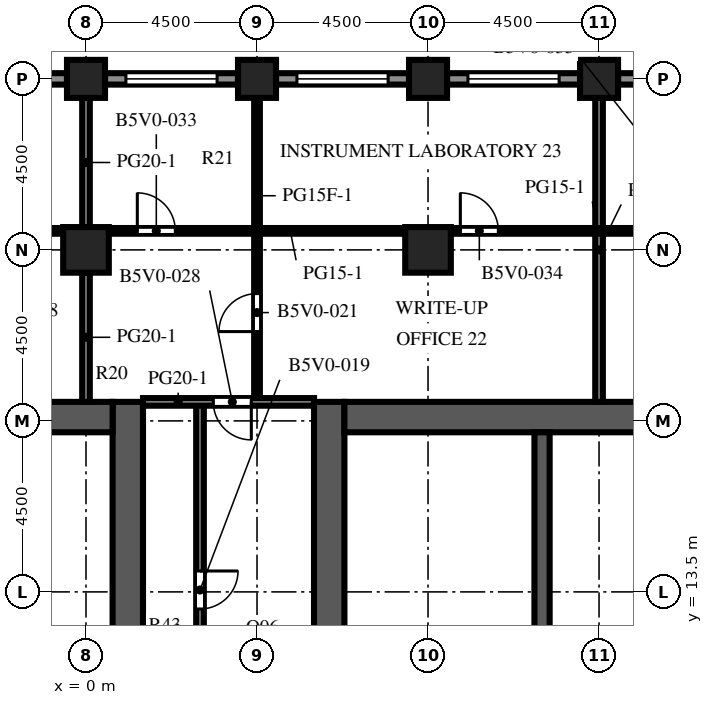
"""IFC4 building model, lengths in metres.
Left out: names, types, materials, properties, quantities, classifications, styles, units other than length and angle.
Written with IfcOpenShell. Run it as: python <this file> out.ifc"""

import sys

from ifc_helpers import new_model, si_unit, direction, frame, frame_2d, origin, origin_2d, place, context, subcontext, project, spatial, rectangle, extrude, element, fill, save


model = new_model("IFC4")
c1 = context("Model", 3, precision=1e-05, world=origin(), true_north=direction((0.0, 1.0)))
c2 = subcontext(c1, "Body", "Model", "MODEL_VIEW")
j1 = project(units=[si_unit("LENGTHUNIT", "METRE"), si_unit("PLANEANGLEUNIT", "RADIAN")], contexts=[c1])
p1 = place(None, origin())
s1 = spatial("IfcSite", under=j1, at=p1, CompositionType="ELEMENT")
p2 = place(p1, origin())
s2 = spatial("IfcBuilding", under=s1, at=p2, CompositionType="ELEMENT")
p3 = place(p2, frame((0.0, 0.0, 160.9)))
s3 = spatial("IfcBuildingStorey", under=s2, at=p3, CompositionType="ELEMENT", Elevation=160.9)
for number, where, z_axis, x_axis in (
    (1, (0.0, 27.0, 0.0), (0.0, 0.0, 1.0), (1.0, 0.0, 0.0)),
    (2, (4.5, 27.0, 0.0), (0.0, 0.0, 1.0), (1.0, 0.0, 0.0)),
    (3, (9.0, 27.0, 0.0), (0.0, 0.0, 1.0), (1.0, 0.0, 0.0)),
    (4, (13.5, 27.0, 0.0), (0.0, 0.0, 1.0), (1.0, 0.0, 0.0)),
):
    element("IfcColumn", number, at=place(p3, frame(where, z_axis=z_axis, x_axis=x_axis)), inside=s3, PredefinedType="COLUMN", context=c2, shape_type="SweptSolid", body=[
        extrude(rectangle(XDim=1.0, YDim=1.0, at=origin_2d()), origin(), (0.0, 0.0, 1.0), 4.1),
    ])
for number, where, z_axis, x_axis in (
    (5, (0.0, 22.5, 0.0), (0.0, 0.0, 1.0), (1.0, 0.0, 0.0)),
    (6, (9.0, 22.5, 0.0), (0.0, 0.0, 1.0), (1.0, 0.0, 0.0)),
):
    element("IfcColumn", number, at=place(p3, frame(where, z_axis=z_axis, x_axis=x_axis)), inside=s3, PredefinedType="COLUMN", context=c2, shape_type="SweptSolid", body=[
        extrude(rectangle(XDim=1.2, YDim=1.2, at=origin_2d()), origin(), (0.0, 0.0, 1.0), 4.1),
    ])
p4 = place(p3, frame((1.1, -9.0, 0.0), z_axis=(0.0, 0.0, 1.0), x_axis=(0.0, 1.0, 0.0)))
e7 = element("IfcWall", 7, at=p4, inside=s3, PredefinedType="SHEAR", context=c2, shape_type="SweptSolid", body=[
    extrude(rectangle(XDim=27.5, YDim=0.8, at=frame_2d((13.75, 0.0))), origin(), (0.0, 0.0, 1.0), 4.1),
])
p5 = place(p4, frame((12.55, 0.0, 0.0)))
e8 = element("IfcOpeningElement", 8, at=p5, cuts=e7, PredefinedType="OPENING", context=c2, shape_type="SweptSolid", body=[
    extrude(rectangle(XDim=2.4, YDim=2.4, at=frame_2d((1.2, 1.2))), frame((0.0, 0.41, 0.0), z_axis=(0.0, -1.0, 0.0), x_axis=(1.0, 0.0, 0.0)), (0.0, 0.0, 1.0), 0.82),
])
p6 = place(p4, frame((5.45, 0.0, 0.0)))
e9 = element("IfcOpeningElement", 9, at=p6, cuts=e7, PredefinedType="OPENING", context=c2, shape_type="SweptSolid", body=[
    extrude(rectangle(XDim=1.2, YDim=2.1, at=frame_2d((0.6, 1.05))), frame((0.0, 0.41, 0.0), z_axis=(0.0, -1.0, 0.0), x_axis=(1.0, 0.0, 0.0)), (0.0, 0.0, 1.0), 0.82),
])
p7 = place(p4, frame((19.45, 0.0, 0.0)))
e10 = element("IfcOpeningElement", 10, at=p7, cuts=e7, PredefinedType="OPENING", context=c2, shape_type="SweptSolid", body=[
    extrude(rectangle(XDim=1.0, YDim=2.1, at=frame_2d((0.5, 1.05))), frame((0.0, 0.41, 0.0), z_axis=(0.0, -1.0, 0.0), x_axis=(1.0, 0.0, 0.0)), (0.0, 0.0, 1.0), 0.82),
])
p8 = place(p4, frame((21.137, 0.0, 0.0)))
e11 = element("IfcOpeningElement", 11, at=p8, cuts=e7, PredefinedType="OPENING", context=c2, shape_type="SweptSolid", body=[
    extrude(rectangle(XDim=1.0, YDim=2.1, at=frame_2d((0.5, 1.05))), frame((0.0, 0.41, 0.0), z_axis=(0.0, -1.0, 0.0), x_axis=(1.0, 0.0, 0.0)), (0.0, 0.0, 1.0), 0.82),
])
p9 = place(p4, frame((23.2, 0.0, 0.0)))
e12 = element("IfcOpeningElement", 12, at=p9, cuts=e7, PredefinedType="OPENING", context=c2, shape_type="SweptSolid", body=[
    extrude(rectangle(XDim=1.0, YDim=2.1, at=frame_2d((0.5, 1.05))), frame((0.0, 0.41, 0.0), z_axis=(0.0, -1.0, 0.0), x_axis=(1.0, 0.0, 0.0)), (0.0, 0.0, 1.0), 0.82),
])
p10 = place(p4, frame((25.262, 0.0, 0.0)))
e13 = element("IfcOpeningElement", 13, at=p10, cuts=e7, PredefinedType="OPENING", context=c2, shape_type="SweptSolid", body=[
    extrude(rectangle(XDim=1.0, YDim=2.1, at=frame_2d((0.5, 1.05))), frame((0.0, 0.41, 0.0), z_axis=(0.0, -1.0, 0.0), x_axis=(1.0, 0.0, 0.0)), (0.0, 0.0, 1.0), 0.82),
])
p11 = place(p3, frame((-9.7, 18.1, 0.0), z_axis=(0.0, 0.0, 1.0), x_axis=(1.0, 0.0, 0.0)))
e14 = element("IfcWall", 14, at=p11, inside=s3, PredefinedType="SHEAR", context=c2, shape_type="SweptSolid", body=[
    extrude(rectangle(XDim=10.4, YDim=0.8, at=frame_2d((5.2, 0.0))), origin(), (0.0, 0.0, 1.0), 4.1),
])
p12 = place(p3, frame((6.4, -9.0, 0.0), z_axis=(0.0, 0.0, 1.0), x_axis=(0.0, 1.0, 0.0)))
e15 = element("IfcWall", 15, at=p12, inside=s3, PredefinedType="SHEAR", context=c2, shape_type="SweptSolid", body=[
    extrude(rectangle(XDim=27.5, YDim=0.8, at=frame_2d((13.75, 0.0))), origin(), (0.0, 0.0, 1.0), 4.1),
])
p13 = place(p12, frame((12.55, 0.0, 0.0)))
e16 = element("IfcOpeningElement", 16, at=p13, cuts=e15, PredefinedType="OPENING", context=c2, shape_type="SweptSolid", body=[
    extrude(rectangle(XDim=2.4, YDim=2.4, at=frame_2d((1.2, 1.2))), frame((0.0, 0.41, 0.0), z_axis=(0.0, -1.0, 0.0), x_axis=(1.0, 0.0, 0.0)), (0.0, 0.0, 1.0), 0.82),
])
p14 = place(p12, frame((5.45, 0.0, 0.0)))
e17 = element("IfcOpeningElement", 17, at=p14, cuts=e15, PredefinedType="OPENING", context=c2, shape_type="SweptSolid", body=[
    extrude(rectangle(XDim=1.2, YDim=2.1, at=frame_2d((0.6, 1.05))), frame((0.0, 0.41, 0.0), z_axis=(0.0, -1.0, 0.0), x_axis=(1.0, 0.0, 0.0)), (0.0, 0.0, 1.0), 0.82),
])
p15 = place(p12, frame((19.45, 0.0, 0.0)))
e18 = element("IfcOpeningElement", 18, at=p15, cuts=e15, PredefinedType="OPENING", context=c2, shape_type="SweptSolid", body=[
    extrude(rectangle(XDim=1.0, YDim=2.1, at=frame_2d((0.5, 1.05))), frame((0.0, 0.41, 0.0), z_axis=(0.0, -1.0, 0.0), x_axis=(1.0, 0.0, 0.0)), (0.0, 0.0, 1.0), 0.82),
])
p16 = place(p12, frame((21.137, 0.0, 0.0)))
e19 = element("IfcOpeningElement", 19, at=p16, cuts=e15, PredefinedType="OPENING", context=c2, shape_type="SweptSolid", body=[
    extrude(rectangle(XDim=1.0, YDim=2.1, at=frame_2d((0.5, 1.05))), frame((0.0, 0.41, 0.0), z_axis=(0.0, -1.0, 0.0), x_axis=(1.0, 0.0, 0.0)), (0.0, 0.0, 1.0), 0.82),
])
p17 = place(p12, frame((23.2, 0.0, 0.0)))
e20 = element("IfcOpeningElement", 20, at=p17, cuts=e15, PredefinedType="OPENING", context=c2, shape_type="SweptSolid", body=[
    extrude(rectangle(XDim=1.0, YDim=2.1, at=frame_2d((0.5, 1.05))), frame((0.0, 0.41, 0.0), z_axis=(0.0, -1.0, 0.0), x_axis=(1.0, 0.0, 0.0)), (0.0, 0.0, 1.0), 0.82),
])
p18 = place(p12, frame((25.262, 0.0, 0.0)))
e21 = element("IfcOpeningElement", 21, at=p18, cuts=e15, PredefinedType="OPENING", context=c2, shape_type="SweptSolid", body=[
    extrude(rectangle(XDim=1.0, YDim=2.1, at=frame_2d((0.5, 1.05))), frame((0.0, 0.41, 0.0), z_axis=(0.0, -1.0, 0.0), x_axis=(1.0, 0.0, 0.0)), (0.0, 0.0, 1.0), 0.82),
])
p19 = place(p3, frame((6.8, 18.1, 0.0), z_axis=(0.0, 0.0, 1.0), x_axis=(1.0, 0.0, 0.0)))
e22 = element("IfcWall", 22, at=p19, inside=s3, PredefinedType="SHEAR", context=c2, shape_type="SweptSolid", body=[
    extrude(rectangle(XDim=10.4, YDim=0.8, at=frame_2d((5.2, 0.0))), origin(), (0.0, 0.0, 1.0), 4.1),
])
p20 = place(p3, frame((12.0, 10.2, 0.0), z_axis=(0.0, 0.0, 1.0), x_axis=(0.0, 1.0, 0.0)))
e23 = element("IfcWall", 23, at=p20, inside=s3, PredefinedType="SHEAR", context=c2, shape_type="SweptSolid", body=[
    extrude(rectangle(XDim=7.5, YDim=0.4, at=frame_2d((3.75, 0.0))), origin(), (0.0, 0.0, 1.0), 4.1),
])
p21 = place(p3, frame((14.0, 27.0, 0.0), z_axis=(0.0, 0.0, 1.0), x_axis=(1.0, 0.0, 0.0)))
e24 = element("IfcWall", 24, at=p21, inside=s3, PredefinedType="SOLIDWALL", context=c2, shape_type="SweptSolid", body=[
    extrude(rectangle(XDim=3.5, YDim=0.3, at=frame_2d((1.75, 0.0))), origin(), (0.0, 0.0, 1.0), 2.85),
])
p22 = place(p21, frame((1.25, 0.0, 0.0)))
e25 = element("IfcOpeningElement", 25, at=p22, cuts=e24, PredefinedType="OPENING", context=c2, shape_type="SweptSolid", body=[
    extrude(rectangle(XDim=1.0, YDim=2.2, at=frame_2d((0.5, 1.1))), frame((0.0, 0.16, 0.0), z_axis=(0.0, -1.0, 0.0), x_axis=(1.0, 0.0, 0.0)), (0.0, 0.0, 1.0), 0.32),
])
p23 = place(p3, frame((9.5, 27.0, 0.0), z_axis=(0.0, 0.0, 1.0), x_axis=(1.0, 0.0, 0.0)))
e26 = element("IfcWall", 26, at=p23, inside=s3, PredefinedType="SOLIDWALL", context=c2, shape_type="SweptSolid", body=[
    extrude(rectangle(XDim=3.5, YDim=0.3, at=frame_2d((1.75, 0.0))), origin(), (0.0, 0.0, 1.0), 2.85),
])
p24 = place(p23, frame((0.55, 0.0, 0.8)))
e27 = element("IfcOpeningElement", 27, at=p24, cuts=e26, PredefinedType="OPENING", context=c2, shape_type="SweptSolid", body=[
    extrude(rectangle(XDim=2.4, YDim=1.7, at=frame_2d((1.2, 0.85))), frame((0.0, 0.16, 0.0), z_axis=(0.0, -1.0, 0.0), x_axis=(1.0, 0.0, 0.0)), (0.0, 0.0, 1.0), 0.32),
])
p25 = place(p3, frame((5.0, 27.0, 0.0), z_axis=(0.0, 0.0, 1.0), x_axis=(1.0, 0.0, 0.0)))
e28 = element("IfcWall", 28, at=p25, inside=s3, PredefinedType="SOLIDWALL", context=c2, shape_type="SweptSolid", body=[
    extrude(rectangle(XDim=3.5, YDim=0.3, at=frame_2d((1.75, 0.0))), origin(), (0.0, 0.0, 1.0), 2.85),
])
p26 = place(p25, frame((0.55, 0.0, 0.8)))
e29 = element("IfcOpeningElement", 29, at=p26, cuts=e28, PredefinedType="OPENING", context=c2, shape_type="SweptSolid", body=[
    extrude(rectangle(XDim=2.4, YDim=1.7, at=frame_2d((1.2, 0.85))), frame((0.0, 0.16, 0.0), z_axis=(0.0, -1.0, 0.0), x_axis=(1.0, 0.0, 0.0)), (0.0, 0.0, 1.0), 0.32),
])
p27 = place(p3, frame((0.5, 27.0, 0.0), z_axis=(0.0, 0.0, 1.0), x_axis=(1.0, 0.0, 0.0)))
e30 = element("IfcWall", 30, at=p27, inside=s3, PredefinedType="SOLIDWALL", context=c2, shape_type="SweptSolid", body=[
    extrude(rectangle(XDim=3.5, YDim=0.3, at=frame_2d((1.75, 0.0))), origin(), (0.0, 0.0, 1.0), 2.85),
])
p28 = place(p27, frame((0.55, 0.0, 0.8)))
e31 = element("IfcOpeningElement", 31, at=p28, cuts=e30, PredefinedType="OPENING", context=c2, shape_type="SweptSolid", body=[
    extrude(rectangle(XDim=2.4, YDim=1.7, at=frame_2d((1.2, 0.85))), frame((0.0, 0.16, 0.0), z_axis=(0.0, -1.0, 0.0), x_axis=(1.0, 0.0, 0.0)), (0.0, 0.0, 1.0), 0.32),
])
p29 = place(p3, frame((-4.0, 27.0, 0.0), z_axis=(0.0, 0.0, 1.0), x_axis=(1.0, 0.0, 0.0)))
e32 = element("IfcWall", 32, at=p29, inside=s3, PredefinedType="SOLIDWALL", context=c2, shape_type="SweptSolid", body=[
    extrude(rectangle(XDim=3.5, YDim=0.3, at=frame_2d((1.75, 0.0))), origin(), (0.0, 0.0, 1.0), 2.85),
])
p30 = place(p29, frame((0.55, 0.0, 0.8)))
e33 = element("IfcOpeningElement", 33, at=p30, cuts=e32, PredefinedType="OPENING", context=c2, shape_type="SweptSolid", body=[
    extrude(rectangle(XDim=2.4, YDim=1.7, at=frame_2d((1.2, 0.85))), frame((0.0, 0.16, 0.0), z_axis=(0.0, -1.0, 0.0), x_axis=(1.0, 0.0, 0.0)), (0.0, 0.0, 1.0), 0.32),
])
for number, where, z_axis, x_axis in (
    (34, (-4.3, 13.575, 0.0), (0.0, 0.0, 1.0), (1.0, 0.0, 0.0)),
    (35, (-4.3, 15.825, 0.0), (0.0, 0.0, 1.0), (1.0, 0.0, 0.0)),
    (36, (6.8, 13.575, 0.0), (0.0, 0.0, 1.0), (1.0, 0.0, 0.0)),
    (37, (6.8, 15.825, 0.0), (0.0, 0.0, 1.0), (1.0, 0.0, 0.0)),
):
    element("IfcWall", number, at=place(p3, frame(where, z_axis=z_axis, x_axis=x_axis)), inside=s3, PredefinedType="PARTITIONING", context=c2, shape_type="SweptSolid", body=[
        extrude(rectangle(XDim=5.0, YDim=0.1, at=frame_2d((2.5, 0.0))), origin(), (0.0, 0.0, 1.0), 3.65),
    ])
for number, where, z_axis, x_axis in (
    (38, (0.0, 18.5, 0.0), (0.0, 0.0, 1.0), (0.0, 1.0, 0.0)),
    (39, (0.0, 23.1, 0.0), (0.0, 0.0, 1.0), (0.0, 1.0, 0.0)),
):
    element("IfcWall", number, at=place(p3, frame(where, z_axis=z_axis, x_axis=x_axis)), inside=s3, PredefinedType="PARTITIONING", context=c2, shape_type="SweptSolid", body=[
        extrude(rectangle(XDim=3.4, YDim=0.2, at=frame_2d((1.7, 0.0))), origin(), (0.0, 0.0, 1.0), 3.65),
    ])
p31 = place(p3, frame((3.0, 6.7, 0.0), z_axis=(0.0, 0.0, 1.0), x_axis=(0.0, 1.0, 0.0)))
e40 = element("IfcWall", 40, at=p31, inside=s3, PredefinedType="PARTITIONING", context=c2, shape_type="SweptSolid", body=[
    extrude(rectangle(XDim=11.8, YDim=0.2, at=frame_2d((5.9, 0.0))), origin(), (0.0, 0.0, 1.0), 3.65),
])
p32 = place(p31, frame((6.35, 0.0, 0.0)))
e41 = element("IfcOpeningElement", 41, at=p32, cuts=e40, PredefinedType="OPENING", context=c2, shape_type="SweptSolid", body=[
    extrude(rectangle(XDim=1.0, YDim=2.1, at=frame_2d((0.5, 1.05))), frame((0.0, 0.11, 0.0), z_axis=(0.0, -1.0, 0.0), x_axis=(1.0, 0.0, 0.0)), (0.0, 0.0, 1.0), 0.22),
])
p33 = place(p3, frame((4.5, 26.5, 0.0), z_axis=(0.0, 0.0, 1.0), x_axis=(0.0, -1.0, 0.0)))
e42 = element("IfcWall", 42, at=p33, inside=s3, PredefinedType="PARTITIONING", context=c2, shape_type="SweptSolid", body=[
    extrude(rectangle(XDim=8.0, YDim=0.15, at=frame_2d((4.0, 0.0))), origin(), (0.0, 0.0, 1.0), 3.65),
])
p34 = place(p33, frame((5.15, 0.0, 0.0)))
e43 = element("IfcOpeningElement", 43, at=p34, cuts=e42, PredefinedType="OPENING", context=c2, shape_type="SweptSolid", body=[
    extrude(rectangle(XDim=1.0, YDim=2.1, at=frame_2d((0.5, 1.05))), frame((0.0, 0.085, 0.0), z_axis=(0.0, -1.0, 0.0), x_axis=(1.0, 0.0, 0.0)), (0.0, 0.0, 1.0), 0.17),
])
p35 = place(p3, frame((13.5, 18.5, 0.0), z_axis=(0.0, 0.0, 1.0), x_axis=(0.0, 1.0, 0.0)))
e44 = element("IfcWall", 44, at=p35, inside=s3, PredefinedType="PARTITIONING", context=c2, shape_type="SweptSolid", body=[
    extrude(rectangle(XDim=8.0, YDim=0.2, at=frame_2d((4.0, 0.0))), origin(), (0.0, 0.0, 1.0), 3.65),
])
p36 = place(p3, frame((1.5, 18.5, 0.0), z_axis=(0.0, 0.0, 1.0), x_axis=(1.0, 0.0, 0.0)))
e45 = element("IfcWall", 45, at=p36, inside=s3, PredefinedType="PARTITIONING", context=c2, shape_type="SweptSolid", body=[
    extrude(rectangle(XDim=4.5, YDim=0.2, at=frame_2d((2.25, 0.0))), origin(), (0.0, 0.0, 1.0), 3.65),
])
p37 = place(p36, frame((1.85, 0.0, 0.0)))
e46 = element("IfcOpeningElement", 46, at=p37, cuts=e45, PredefinedType="OPENING", context=c2, shape_type="SweptSolid", body=[
    extrude(rectangle(XDim=1.0, YDim=2.1, at=frame_2d((0.5, 1.05))), frame((0.0, 0.11, 0.0), z_axis=(0.0, -1.0, 0.0), x_axis=(1.0, 0.0, 0.0)), (0.0, 0.0, 1.0), 0.22),
])
p38 = place(p3, frame((-8.4, 23.0, 0.0), z_axis=(0.0, 0.0, 1.0), x_axis=(1.0, 0.0, 0.0)))
e47 = element("IfcWall", 47, at=p38, inside=s3, PredefinedType="PARTITIONING", context=c2, shape_type="SweptSolid", body=[
    extrude(rectangle(XDim=7.8, YDim=0.15, at=frame_2d((3.9, 0.0))), origin(), (0.0, 0.0, 1.0), 3.65),
])
p39 = place(p38, frame((3.0, 0.0, 0.0)))
e48 = element("IfcOpeningElement", 48, at=p39, cuts=e47, PredefinedType="OPENING", context=c2, shape_type="SweptSolid", body=[
    extrude(rectangle(XDim=1.0, YDim=2.1, at=frame_2d((0.5, 1.05))), frame((0.0, 0.085, 0.0), z_axis=(0.0, -1.0, 0.0), x_axis=(1.0, 0.0, 0.0)), (0.0, 0.0, 1.0), 0.17),
])
p40 = place(p3, frame((0.6, 23.0, 0.0), z_axis=(0.0, 0.0, 1.0), x_axis=(1.0, 0.0, 0.0)))
e49 = element("IfcWall", 49, at=p40, inside=s3, PredefinedType="PARTITIONING", context=c2, shape_type="SweptSolid", body=[
    extrude(rectangle(XDim=7.8, YDim=0.15, at=frame_2d((3.9, 0.0))), origin(), (0.0, 0.0, 1.0), 3.65),
])
p41 = place(p40, frame((0.75, 0.0, 0.0)))
e50 = element("IfcOpeningElement", 50, at=p41, cuts=e49, PredefinedType="OPENING", context=c2, shape_type="SweptSolid", body=[
    extrude(rectangle(XDim=1.0, YDim=2.1, at=frame_2d((0.5, 1.05))), frame((0.0, 0.085, 0.0), z_axis=(0.0, -1.0, 0.0), x_axis=(1.0, 0.0, 0.0)), (0.0, 0.0, 1.0), 0.17),
])
p42 = place(p3, frame((9.6, 23.0, 0.0), z_axis=(0.0, 0.0, 1.0), x_axis=(1.0, 0.0, 0.0)))
e51 = element("IfcWall", 51, at=p42, inside=s3, PredefinedType="PARTITIONING", context=c2, shape_type="SweptSolid", body=[
    extrude(rectangle(XDim=7.8, YDim=0.15, at=frame_2d((3.9, 0.0))), origin(), (0.0, 0.0, 1.0), 3.65),
])
p43 = place(p42, frame((0.25, 0.0, 0.0)))
e52 = element("IfcOpeningElement", 52, at=p43, cuts=e51, PredefinedType="OPENING", context=c2, shape_type="SweptSolid", body=[
    extrude(rectangle(XDim=1.0, YDim=2.1, at=frame_2d((0.5, 1.05))), frame((0.0, 0.085, 0.0), z_axis=(0.0, -1.0, 0.0), x_axis=(1.0, 0.0, 0.0)), (0.0, 0.0, 1.0), 0.17),
])
p44 = place(p42, frame((6.5, 0.0, 0.0)))
e53 = element("IfcOpeningElement", 53, at=p44, cuts=e51, PredefinedType="OPENING", context=c2, shape_type="SweptSolid", body=[
    extrude(rectangle(XDim=1.0, YDim=2.1, at=frame_2d((0.5, 1.05))), frame((0.0, 0.085, 0.0), z_axis=(0.0, -1.0, 0.0), x_axis=(1.0, 0.0, 0.0)), (0.0, 0.0, 1.0), 0.17),
])
p45 = place(p24, origin())
e54 = element("IfcWindow", 54, at=p45, inside=s3, PartitioningType="SINGLE_PANEL", PredefinedType="WINDOW", context=c2, shape_type="SweptSolid", body=[
    extrude(rectangle(XDim=2.4, YDim=1.7, at=frame_2d((1.2, 0.85))), frame((0.0, 0.03, 0.0), z_axis=(0.0, -1.0, 0.0), x_axis=(1.0, 0.0, 0.0)), (0.0, 0.0, 1.0), 0.06),
])
fill(e27, e54)
p46 = place(p26, origin())
e55 = element("IfcWindow", 55, at=p46, inside=s3, PartitioningType="SINGLE_PANEL", PredefinedType="WINDOW", context=c2, shape_type="SweptSolid", body=[
    extrude(rectangle(XDim=2.4, YDim=1.7, at=frame_2d((1.2, 0.85))), frame((0.0, 0.03, 0.0), z_axis=(0.0, -1.0, 0.0), x_axis=(1.0, 0.0, 0.0)), (0.0, 0.0, 1.0), 0.06),
])
fill(e29, e55)
p47 = place(p28, origin())
e56 = element("IfcWindow", 56, at=p47, inside=s3, PartitioningType="SINGLE_PANEL", PredefinedType="WINDOW", context=c2, shape_type="SweptSolid", body=[
    extrude(rectangle(XDim=2.4, YDim=1.7, at=frame_2d((1.2, 0.85))), frame((0.0, 0.03, 0.0), z_axis=(0.0, -1.0, 0.0), x_axis=(1.0, 0.0, 0.0)), (0.0, 0.0, 1.0), 0.06),
])
fill(e31, e56)
p48 = place(p8, origin())
e57 = element("IfcDoor", 57, at=p48, inside=s3, OperationType="SINGLE_SWING_RIGHT", PredefinedType="DOOR", context=c2, shape_type="SweptSolid", body=[
    extrude(rectangle(XDim=1.0, YDim=2.1, at=frame_2d((0.5, 1.05))), frame((0.0, 0.375, 0.0), z_axis=(0.0, -1.0, 0.0), x_axis=(1.0, 0.0, 0.0)), (0.0, 0.0, 1.0), 0.05),
])
fill(e11, e57)
p49 = place(p9, origin())
e58 = element("IfcDoor", 58, at=p49, inside=s3, OperationType="SINGLE_SWING_LEFT", PredefinedType="DOOR", context=c2, shape_type="SweptSolid", body=[
    extrude(rectangle(XDim=1.0, YDim=2.1, at=frame_2d((0.5, 1.05))), frame((0.0, 0.375, 0.0), z_axis=(0.0, -1.0, 0.0), x_axis=(1.0, 0.0, 0.0)), (0.0, 0.0, 1.0), 0.05),
])
fill(e12, e58)
p50 = place(p10, origin())
e59 = element("IfcDoor", 59, at=p50, inside=s3, OperationType="SINGLE_SWING_RIGHT", PredefinedType="DOOR", context=c2, shape_type="SweptSolid", body=[
    extrude(rectangle(XDim=1.0, YDim=2.1, at=frame_2d((0.5, 1.05))), frame((0.0, 0.375, 0.0), z_axis=(0.0, -1.0, 0.0), x_axis=(1.0, 0.0, 0.0)), (0.0, 0.0, 1.0), 0.05),
])
fill(e13, e59)
p51 = place(p16, origin())
e60 = element("IfcDoor", 60, at=p51, inside=s3, OperationType="SINGLE_SWING_LEFT", PredefinedType="DOOR", context=c2, shape_type="SweptSolid", body=[
    extrude(rectangle(XDim=1.0, YDim=2.1, at=frame_2d((0.5, 1.05))), frame((0.0, -0.325, 0.0), z_axis=(0.0, -1.0, 0.0), x_axis=(1.0, 0.0, 0.0)), (0.0, 0.0, 1.0), 0.05),
])
fill(e19, e60)
p52 = place(p17, origin())
e61 = element("IfcDoor", 61, at=p52, inside=s3, OperationType="SINGLE_SWING_RIGHT", PredefinedType="DOOR", context=c2, shape_type="SweptSolid", body=[
    extrude(rectangle(XDim=1.0, YDim=2.1, at=frame_2d((0.5, 1.05))), frame((0.0, -0.325, 0.0), z_axis=(0.0, -1.0, 0.0), x_axis=(1.0, 0.0, 0.0)), (0.0, 0.0, 1.0), 0.05),
])
fill(e20, e61)
p53 = place(p18, origin())
e62 = element("IfcDoor", 62, at=p53, inside=s3, OperationType="SINGLE_SWING_LEFT", PredefinedType="DOOR", context=c2, shape_type="SweptSolid", body=[
    extrude(rectangle(XDim=1.0, YDim=2.1, at=frame_2d((0.5, 1.05))), frame((0.0, -0.325, 0.0), z_axis=(0.0, -1.0, 0.0), x_axis=(1.0, 0.0, 0.0)), (0.0, 0.0, 1.0), 0.05),
])
fill(e21, e62)
p54 = place(p32, origin())
e63 = element("IfcDoor", 63, at=p54, inside=s3, OperationType="SINGLE_SWING_RIGHT", PredefinedType="DOOR", context=c2, shape_type="SweptSolid", body=[
    extrude(rectangle(XDim=1.0, YDim=2.1, at=frame_2d((0.5, 1.05))), frame((0.0, 0.025, 0.0), z_axis=(0.0, -1.0, 0.0), x_axis=(1.0, 0.0, 0.0)), (0.0, 0.0, 1.0), 0.05),
])
fill(e41, e63)
p55 = place(p34, origin())
e64 = element("IfcDoor", 64, at=p55, inside=s3, OperationType="SINGLE_SWING_RIGHT", PredefinedType="DOOR", context=c2, shape_type="SweptSolid", body=[
    extrude(rectangle(XDim=1.0, YDim=2.1, at=frame_2d((0.5, 1.05))), frame((0.0, 0.025, 0.0), z_axis=(0.0, -1.0, 0.0), x_axis=(1.0, 0.0, 0.0)), (0.0, 0.0, 1.0), 0.05),
])
fill(e43, e64)
p56 = place(p37, origin())
e65 = element("IfcDoor", 65, at=p56, inside=s3, OperationType="SINGLE_SWING_RIGHT", PredefinedType="DOOR", context=c2, shape_type="SweptSolid", body=[
    extrude(rectangle(XDim=1.0, YDim=2.1, at=frame_2d((0.5, 1.05))), frame((0.0, 0.025, 0.0), z_axis=(0.0, -1.0, 0.0), x_axis=(1.0, 0.0, 0.0)), (0.0, 0.0, 1.0), 0.05),
])
fill(e46, e65)
p57 = place(p41, origin())
e66 = element("IfcDoor", 66, at=p57, inside=s3, OperationType="SINGLE_SWING_LEFT", PredefinedType="DOOR", context=c2, shape_type="SweptSolid", body=[
    extrude(rectangle(XDim=1.0, YDim=2.1, at=frame_2d((0.5, 1.05))), frame((0.0, 0.025, 0.0), z_axis=(0.0, -1.0, 0.0), x_axis=(1.0, 0.0, 0.0)), (0.0, 0.0, 1.0), 0.05),
])
fill(e50, e66)
p58 = place(p43, origin())
e67 = element("IfcDoor", 67, at=p58, inside=s3, OperationType="SINGLE_SWING_LEFT", PredefinedType="DOOR", context=c2, shape_type="SweptSolid", body=[
    extrude(rectangle(XDim=1.0, YDim=2.1, at=frame_2d((0.5, 1.05))), frame((0.0, 0.025, 0.0), z_axis=(0.0, -1.0, 0.0), x_axis=(1.0, 0.0, 0.0)), (0.0, 0.0, 1.0), 0.05),
])
fill(e52, e67)
save(model, sys.argv[1])
